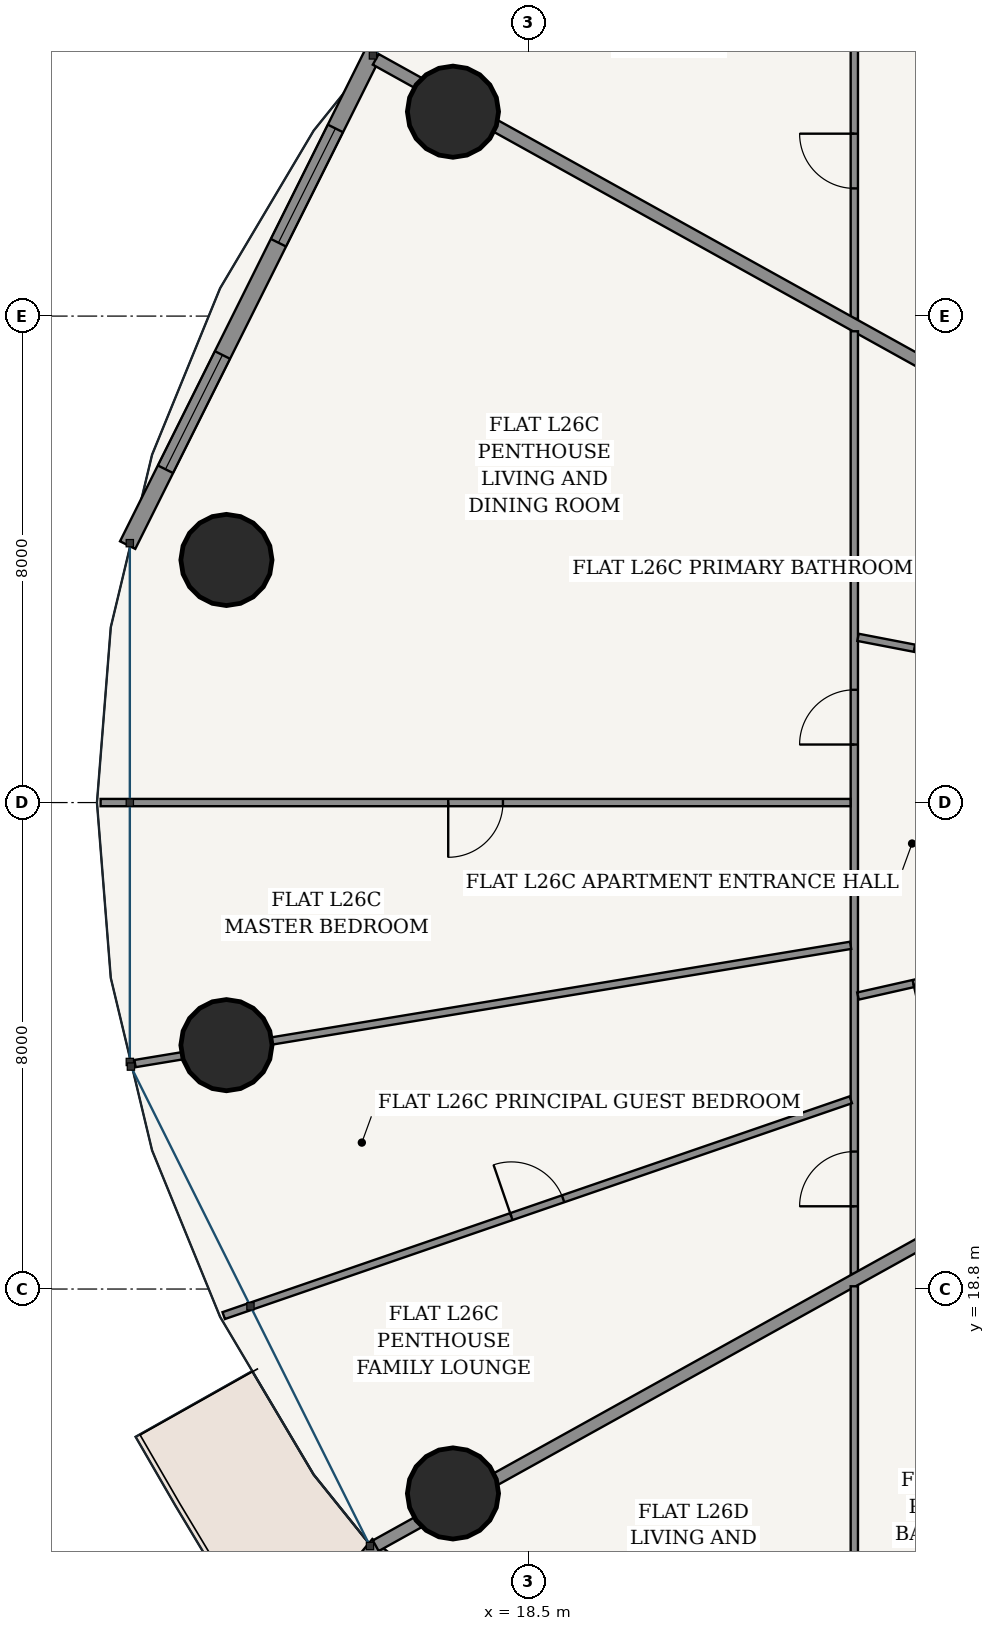
"""IFC4 building model, lengths in metres.
Left out: names, types, materials, properties, quantities, classifications, styles, units other than length and angle.
Written with IfcOpenShell. Run it as: python <this file> out.ifc"""

import sys

from ifc_helpers import new_model, si_unit, direction, frame, frame_2d, origin, origin_2d, place, context, subcontext, project, spatial, rectangle, hollow_circle, extrude, source, transform, mapped, element, fill, save


model = new_model("IFC4")
c1 = context("Model", 3, precision=1e-05, world=origin(), true_north=direction((-0.2419218956, 0.970295726276)))
c2 = subcontext(c1, "Body", "Model", "MODEL_VIEW")
j1 = project(units=[si_unit("LENGTHUNIT", "METRE"), si_unit("PLANEANGLEUNIT", "RADIAN")], contexts=[c1])
p1 = place(None, origin())
s1 = spatial("IfcSite", under=j1, at=p1, CompositionType="ELEMENT")
p2 = place(p1, origin())
s2 = spatial("IfcBuilding", under=s1, at=p2, CompositionType="ELEMENT")
p3 = place(p2, frame((0.0, 0.0, 101.4)))
s3 = spatial("IfcBuildingStorey", under=s2, at=p3, CompositionType="ELEMENT", Elevation=101.4)
for number, where, z_axis, x_axis in (
    (1, (17.255, 38.161, 0.0), (0.0, 0.0, 1.0), (1.0, 0.0, 0.0)),
    (2, (13.529, 30.79, 0.0), (0.0, 0.0, 1.0), (1.0, 0.0, 0.0)),
    (3, (13.529, 22.81, 0.0), (0.0, 0.0, 1.0), (1.0, 0.0, 0.0)),
    (4, (17.255, 15.438, 0.0), (0.0, 0.0, 1.0), (1.0, 0.0, 0.0)),
):
    element("IfcColumn", number, at=place(p3, frame(where, z_axis=z_axis, x_axis=x_axis)), inside=s3, PredefinedType="COLUMN", context=c2, shape_type="SweptSolid", body=[
        extrude(hollow_circle(Radius=0.75, WallThickness=0.045, at=origin_2d()), origin(), (0.0, 0.0, 1.0), 3.6),
    ])
p4 = place(p3, frame((15.944, 39.133, 0.0), z_axis=(0.0, 0.0, 1.0), x_axis=(-0.446263788661, -0.894901464369, 0.0)))
e5 = element("IfcWall", 5, at=p4, inside=s3, PredefinedType="SOLIDWALL", context=c2, shape_type="SweptSolid", body=[
    extrude(rectangle(XDim=9.05, YDim=0.28, at=frame_2d((4.525, 0.0))), origin(), (0.0, 0.0, 1.0), 3.325),
])
p5 = place(p4, frame((1.394, 0.0, 0.85)))
e6 = element("IfcOpeningElement", 6, at=p5, cuts=e5, PredefinedType="OPENING", context=c2, shape_type="SweptSolid", body=[
    extrude(rectangle(XDim=2.1, YDim=1.95, at=frame_2d((1.05, 0.975))), frame((0.0, 0.15, 0.0), z_axis=(0.0, -1.0, 0.0), x_axis=(1.0, 0.0, 0.0)), (0.0, 0.0, 1.0), 0.3),
])
p6 = place(p4, frame((5.557, 0.0, 0.85)))
e7 = element("IfcOpeningElement", 7, at=p6, cuts=e5, PredefinedType="OPENING", context=c2, shape_type="SweptSolid", body=[
    extrude(rectangle(XDim=2.1, YDim=1.95, at=frame_2d((1.05, 0.975))), frame((0.0, 0.15, 0.0), z_axis=(0.0, -1.0, 0.0), x_axis=(1.0, 0.0, 0.0)), (0.0, 0.0, 1.0), 0.3),
])
p7 = place(p3, frame((15.846, 14.59, 0.0), z_axis=(0.0, 0.0, 1.0), x_axis=(0.769254958887, -0.638941944333, 0.0)))
e8 = element("IfcWall", 8, at=p7, inside=s3, PredefinedType="SOLIDWALL", context=c2, shape_type="SweptSolid", body=[
    extrude(rectangle(XDim=9.69, YDim=0.26, at=frame_2d((4.845, 0.0))), origin(), (0.0, 0.0, 1.0), 3.325),
])
p8 = place(p7, frame((4.17, 0.0, 0.0)))
e9 = element("IfcOpeningElement", 9, at=p8, cuts=e8, PredefinedType="OPENING", context=c2, shape_type="SweptSolid", body=[
    extrude(rectangle(XDim=1.35, YDim=2.2, at=frame_2d((0.675, 1.1))), frame((0.0, 0.14, 0.0), z_axis=(0.0, -1.0, 0.0), x_axis=(1.0, 0.0, 0.0)), (0.0, 0.0, 1.0), 0.28),
])
p9 = place(p3, frame((23.855, 34.754, 0.0), z_axis=(0.0, 0.0, 1.0), x_axis=(0.0, 1.0, 0.0)))
e10 = element("IfcWall", 10, at=p9, inside=s3, PredefinedType="PARTITIONING", context=c2, shape_type="SweptSolid", body=[
    extrude(rectangle(XDim=5.191, YDim=0.12, at=frame_2d((2.595, 0.0))), origin(), (0.0, 0.0, 1.0), 3.004),
])
p10 = place(p9, frame((2.145, 0.0, 0.0)))
e11 = element("IfcOpeningElement", 11, at=p10, cuts=e10, PredefinedType="OPENING", context=c2, shape_type="SweptSolid", body=[
    extrude(rectangle(XDim=0.9, YDim=2.15, at=frame_2d((0.45, 1.075))), frame((0.0, 0.07, 0.0), z_axis=(0.0, -1.0, 0.0), x_axis=(1.0, 0.0, 0.0)), (0.0, 0.0, 1.0), 0.14),
])
p11 = place(p3, frame((26.615, 33.12, 0.0), z_axis=(0.0, 0.0, 1.0), x_axis=(-0.874319192772, 0.485351366692, 0.0)))
e12 = element("IfcWall", 12, at=p11, inside=s3, PredefinedType="PARTITIONING", context=c2, shape_type="SweptSolid", body=[
    extrude(rectangle(XDim=12.158, YDim=0.2, at=frame_2d((6.079, 0.0))), origin(), (0.0, 0.0, 1.0), 2.767),
])
p12 = place(p3, frame((23.855, 19.05, 0.0), z_axis=(0.0, 0.0, 1.0), x_axis=(0.0, 1.0, 0.0)))
e13 = element("IfcWall", 13, at=p12, inside=s3, PredefinedType="PARTITIONING", context=c2, shape_type="SweptSolid", body=[
    extrude(rectangle(XDim=15.501, YDim=0.12, at=frame_2d((7.75, 0.0))), origin(), (0.0, 0.0, 1.0), 2.767),
])
p13 = place(p12, frame((8.705, 0.0, 0.0)))
e14 = element("IfcOpeningElement", 14, at=p13, cuts=e13, PredefinedType="OPENING", context=c2, shape_type="SweptSolid", body=[
    extrude(rectangle(XDim=0.9, YDim=2.15, at=frame_2d((0.45, 1.075))), frame((0.0, 0.07, 0.0), z_axis=(0.0, -1.0, 0.0), x_axis=(1.0, 0.0, 0.0)), (0.0, 0.0, 1.0), 0.14),
])
p14 = place(p12, frame((1.111, 0.0, 0.0)))
e15 = element("IfcOpeningElement", 15, at=p14, cuts=e13, PredefinedType="OPENING", context=c2, shape_type="SweptSolid", body=[
    extrude(rectangle(XDim=0.9, YDim=2.15, at=frame_2d((0.45, 1.075))), frame((0.0, 0.07, 0.0), z_axis=(0.0, -1.0, 0.0), x_axis=(1.0, 0.0, 0.0)), (0.0, 0.0, 1.0), 0.14),
])
p15 = place(p3, frame((23.793, 26.8, 0.0), z_axis=(0.0, 0.0, 1.0), x_axis=(-1.0, 0.0, 0.0)))
e16 = element("IfcWall", 16, at=p15, inside=s3, PredefinedType="PARTITIONING", context=c2, shape_type="SweptSolid", body=[
    extrude(rectangle(XDim=12.333, YDim=0.12, at=frame_2d((6.167, 0.0))), origin(), (0.0, 0.0, 1.0), 2.767),
])
p16 = place(p15, frame((5.717, 0.0, 0.0)))
e17 = element("IfcOpeningElement", 17, at=p16, cuts=e16, PredefinedType="OPENING", context=c2, shape_type="SweptSolid", body=[
    extrude(rectangle(XDim=0.9, YDim=2.15, at=frame_2d((0.45, 1.075))), frame((0.0, 0.07, 0.0), z_axis=(0.0, -1.0, 0.0), x_axis=(1.0, 0.0, 0.0)), (0.0, 0.0, 1.0), 0.14),
])
p17 = place(p3, frame((23.794, 24.452, 0.0), z_axis=(0.0, 0.0, 1.0), x_axis=(-0.986620350945, -0.163034607068, 0.0)))
e18 = element("IfcWall", 18, at=p17, inside=s3, PredefinedType="PARTITIONING", context=c2, shape_type="SweptSolid", body=[
    extrude(rectangle(XDim=11.927, YDim=0.12, at=frame_2d((5.964, 0.0))), origin(), (0.0, 0.0, 1.0), 2.767),
])
p18 = place(p3, frame((23.796, 21.912, 0.0), z_axis=(0.0, 0.0, 1.0), x_axis=(-0.945574063861, -0.325406960209, 0.0)))
e19 = element("IfcWall", 19, at=p18, inside=s3, PredefinedType="PARTITIONING", context=c2, shape_type="SweptSolid", body=[
    extrude(rectangle(XDim=10.906, YDim=0.12, at=frame_2d((5.453, 0.0))), origin(), (0.0, 0.0, 1.0), 2.767),
])
p19 = place(p18, frame((5.003, 0.0, 0.0)))
e20 = element("IfcOpeningElement", 20, at=p19, cuts=e19, PredefinedType="OPENING", context=c2, shape_type="SweptSolid", body=[
    extrude(rectangle(XDim=0.9, YDim=2.15, at=frame_2d((0.45, 1.075))), frame((0.0, 0.07, 0.0), z_axis=(0.0, -1.0, 0.0), x_axis=(1.0, 0.0, 0.0)), (0.0, 0.0, 1.0), 0.14),
])
p20 = place(p3, frame((26.615, 28.996, 0.0), z_axis=(0.0, 0.0, 1.0), x_axis=(-0.98189351628, 0.18943368942, 0.0)))
e21 = element("IfcWall", 21, at=p20, inside=s3, PredefinedType="PARTITIONING", context=c2, shape_type="SweptSolid", body=[
    extrude(rectangle(XDim=2.749, YDim=0.12, at=frame_2d((1.375, 0.0))), origin(), (0.0, 0.0, 1.0), 3.325),
])
p21 = place(p20, frame((0.944, 0.0, 0.0)))
e22 = element("IfcOpeningElement", 22, at=p21, cuts=e21, PredefinedType="OPENING", context=c2, shape_type="SweptSolid", body=[
    extrude(rectangle(XDim=0.86, YDim=2.15, at=frame_2d((0.43, 1.075))), frame((0.0, 0.07, 0.0), z_axis=(0.0, -1.0, 0.0), x_axis=(1.0, 0.0, 0.0)), (0.0, 0.0, 1.0), 0.14),
])
p22 = place(p3, frame((26.615, 24.228, 0.0), z_axis=(0.0, 0.0, 1.0), x_axis=(-0.975417151515, -0.220366468706, 0.0)))
e23 = element("IfcWall", 23, at=p22, inside=s3, PredefinedType="PARTITIONING", context=c2, shape_type="SweptSolid", body=[
    extrude(rectangle(XDim=2.768, YDim=0.12, at=frame_2d((1.384, 0.0))), origin(), (0.0, 0.0, 1.0), 3.325),
])
p23 = place(p22, frame((0.934, 0.0, 0.0)))
e24 = element("IfcOpeningElement", 24, at=p23, cuts=e23, PredefinedType="OPENING", context=c2, shape_type="SweptSolid", body=[
    extrude(rectangle(XDim=0.9, YDim=2.15, at=frame_2d((0.45, 1.075))), frame((0.0, 0.07, 0.0), z_axis=(0.0, -1.0, 0.0), x_axis=(1.0, 0.0, 0.0)), (0.0, 0.0, 1.0), 0.14),
])
p24 = place(p3, frame((26.615, 20.48, 0.0), z_axis=(0.0, 0.0, 1.0), x_axis=(-0.874310671773, -0.48536671623, 0.0)))
e25 = element("IfcWall", 25, at=p24, inside=s3, PredefinedType="PARTITIONING", context=c2, shape_type="SweptSolid", body=[
    extrude(rectangle(XDim=12.159, YDim=0.2, at=frame_2d((6.079, 0.0))), origin(), (0.0, 0.0, 1.0), 2.767),
])
p25 = place(p3, frame((23.855, 13.655, 0.0), z_axis=(0.0, 0.0, 1.0), x_axis=(0.0, 1.0, 0.0)))
e26 = element("IfcWall", 26, at=p25, inside=s3, PredefinedType="PARTITIONING", context=c2, shape_type="SweptSolid", body=[
    extrude(rectangle(XDim=5.19, YDim=0.12, at=frame_2d((2.595, 0.0))), origin(), (0.0, 0.0, 1.0), 3.004),
])
m1 = source(origin(), c2, "Body", "SweptSolid", [
    extrude(rectangle(XDim=2.1, YDim=1.95, at=frame_2d((1.05, 0.975))), frame((0.0, 0.03, 0.0), z_axis=(0.0, -1.0, 0.0), x_axis=(1.0, 0.0, 0.0)), (0.0, 0.0, 1.0), 0.06),
])
p26 = place(p5, origin())
e27 = element("IfcWindow", 27, at=p26, inside=s3, PartitioningType="SINGLE_PANEL", PredefinedType="WINDOW", context=c2, shape_type="MappedRepresentation", body=[
    mapped(m1, transform((0.0, 0.0, 0.0), scale=1.0)),
])
fill(e6, e27)
p27 = place(p6, origin())
e28 = element("IfcWindow", 28, at=p27, inside=s3, PartitioningType="SINGLE_PANEL", PredefinedType="WINDOW", context=c2, shape_type="MappedRepresentation", body=[
    mapped(m1, transform((0.0, 0.0, 0.0), scale=1.0)),
])
fill(e7, e28)
m2 = source(origin(), c2, "Body", "SweptSolid", [
    extrude(rectangle(XDim=0.9, YDim=2.15, at=frame_2d((0.45, 1.075))), frame((0.0, 0.025, 0.0), z_axis=(0.0, -1.0, 0.0), x_axis=(1.0, 0.0, 0.0)), (0.0, 0.0, 1.0), 0.05),
])
p28 = place(p10, origin())
e29 = element("IfcDoor", 29, at=p28, inside=s3, OperationType="SINGLE_SWING_RIGHT", PredefinedType="DOOR", context=c2, shape_type="MappedRepresentation", body=[
    mapped(m2, transform((0.0, 0.0, 0.0), scale=1.0)),
])
fill(e11, e29)
m3 = source(origin(), c2, "Body", "SweptSolid", [
    extrude(rectangle(XDim=0.86, YDim=2.15, at=frame_2d((0.43, 1.075))), frame((0.0, 0.025, 0.0), z_axis=(0.0, -1.0, 0.0), x_axis=(1.0, 0.0, 0.0)), (0.0, 0.0, 1.0), 0.05),
])
p29 = place(p21, frame((0.86, 0.0, 0.0), z_axis=(0.0, 0.0, 1.0), x_axis=(-1.0, 0.0, 0.0)))
e30 = element("IfcDoor", 30, at=p29, inside=s3, OperationType="SINGLE_SWING_RIGHT", PredefinedType="DOOR", context=c2, shape_type="MappedRepresentation", body=[
    mapped(m3, transform((0.0, 0.0, 0.0), scale=1.0)),
])
fill(e22, e30)
p30 = place(p13, origin())
e31 = element("IfcDoor", 31, at=p30, inside=s3, OperationType="SINGLE_SWING_LEFT", PredefinedType="DOOR", context=c2, shape_type="MappedRepresentation", body=[
    mapped(m2, transform((0.0, 0.0, 0.0), scale=1.0)),
])
fill(e14, e31)
p31 = place(p23, origin())
e32 = element("IfcDoor", 32, at=p31, inside=s3, OperationType="SINGLE_SWING_RIGHT", PredefinedType="DOOR", context=c2, shape_type="MappedRepresentation", body=[
    mapped(m2, transform((0.0, 0.0, 0.0), scale=1.0)),
])
fill(e24, e32)
p32 = place(p14, origin())
e33 = element("IfcDoor", 33, at=p32, inside=s3, OperationType="SINGLE_SWING_LEFT", PredefinedType="DOOR", context=c2, shape_type="MappedRepresentation", body=[
    mapped(m2, transform((0.0, 0.0, 0.0), scale=1.0)),
])
fill(e15, e33)
p33 = place(p16, origin())
e34 = element("IfcDoor", 34, at=p33, inside=s3, OperationType="SINGLE_SWING_RIGHT", PredefinedType="DOOR", context=c2, shape_type="MappedRepresentation", body=[
    mapped(m2, transform((0.0, 0.0, 0.0), scale=1.0)),
])
fill(e17, e34)
p34 = place(p19, frame((0.9, 0.0, 0.0), z_axis=(0.0, 0.0, 1.0), x_axis=(-1.0, 0.0, 0.0)))
e35 = element("IfcDoor", 35, at=p34, inside=s3, OperationType="SINGLE_SWING_LEFT", PredefinedType="DOOR", context=c2, shape_type="MappedRepresentation", body=[
    mapped(m2, transform((0.0, 0.0, 0.0), scale=1.0)),
])
fill(e20, e35)
save(model, sys.argv[1])
